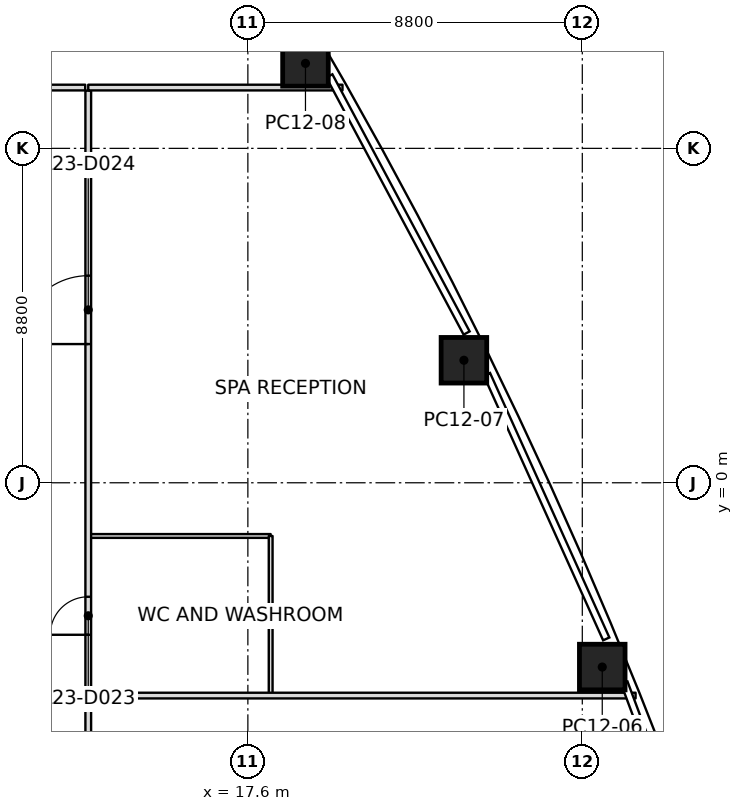
"""IFC4 building model, lengths in metres.
Left out: names, types, materials, properties, quantities, classifications, styles, units other than length and angle.
Written with IfcOpenShell. Run it as: python <this file> out.ifc"""

import sys

from ifc_helpers import new_model, si_unit, direction, frame, frame_2d, origin, origin_2d, place, context, subcontext, project, spatial, rectangle, extrude, clip, halfspace, element, fill, save


model = new_model("IFC4")
c1 = context("Model", 3, precision=1e-05, world=origin(), true_north=direction((0.0, 1.0)))
c2 = subcontext(c1, "Body", "Model", "MODEL_VIEW")
j1 = project(units=[si_unit("LENGTHUNIT", "METRE"), si_unit("PLANEANGLEUNIT", "RADIAN")], contexts=[c1])
p1 = place(None, origin())
s1 = spatial("IfcSite", under=j1, at=p1, CompositionType="ELEMENT")
p2 = place(p1, origin())
s2 = spatial("IfcBuilding", under=s1, at=p2, CompositionType="ELEMENT")
p3 = place(p2, frame((0.0, 0.0, 107.2)))
s3 = spatial("IfcBuildingStorey", under=s2, at=p3, CompositionType="ELEMENT", Elevation=107.2)
p4 = place(p3, frame((26.925, -4.849, 0.0), z_axis=(-0.01329019196, 0.007503985937, 0.999883523713), x_axis=(-0.380349266777, 0.924765125623, -0.011995736484)))
e1 = element("IfcColumn", 1, at=p4, inside=s3, PredefinedType="COLUMN", context=c2, shape_type="SweptSolid", body=[
    clip(clip(extrude(rectangle(XDim=1.2, YDim=1.2, at=origin_2d()), origin(), (0.0, 0.0, 1.0), 5.401), halfspace(frame((0.0, 0.0, 0.003)), True)), halfspace(frame((0.0, 0.0, 5.397)), False)),
])
p5 = place(p3, frame((23.285, 3.224, 0.0), z_axis=(-0.010488130075, 0.001582261003, 0.999943746207), x_axis=(-0.441147996554, 0.897413994602, -0.006047100909)))
e2 = element("IfcColumn", 2, at=p5, inside=s3, PredefinedType="COLUMN", context=c2, shape_type="SweptSolid", body=[
    clip(clip(extrude(rectangle(XDim=1.2, YDim=1.2, at=origin_2d()), origin(), (0.0, 0.0, 1.0), 5.4), halfspace(frame((0.0, 0.0, 0.002)), True)), halfspace(frame((0.0, 0.0, 5.397)), False)),
])
p6 = place(p3, frame((19.116, 11.036, 0.0), z_axis=(-0.007323758915, -0.004204380118, 0.999964342236), x_axis=(-0.499986590459, 0.866033145402, -2.0649448e-05)))
e3 = element("IfcColumn", 3, at=p6, inside=s3, PredefinedType="COLUMN", context=c2, shape_type="SweptSolid", body=[
    clip(clip(extrude(rectangle(XDim=1.2, YDim=1.2, at=origin_2d()), origin(), (0.0, 0.0, 1.0), 5.4), halfspace(frame((0.0, 0.0, 0.001)), True)), halfspace(frame((0.0, 0.0, 5.397)), False)),
])
p7 = place(p3, frame((27.802, -5.6, 0.0), z_axis=(0.0, 0.0, 1.0), x_axis=(-1.0, 0.0, 0.0)))
e4 = element("IfcWall", 4, at=p7, inside=s3, PredefinedType="PARTITIONING", context=c2, shape_type="SweptSolid", body=[
    extrude(rectangle(XDim=14.402, YDim=0.15, at=frame_2d((7.201, 0.0))), origin(), (0.0, 0.0, 1.0), 4.534),
])
p8 = place(p3, frame((13.4, 10.4, 0.0), z_axis=(0.0, 0.0, 1.0), x_axis=(1.0, 0.0, 0.0)))
e5 = element("IfcWall", 5, at=p8, inside=s3, PredefinedType="PARTITIONING", context=c2, shape_type="SweptSolid", body=[
    extrude(rectangle(XDim=6.69, YDim=0.15, at=frame_2d((3.345, 0.0))), origin(), (0.0, 0.0, 1.0), 4.534),
])
p9 = place(p3, frame((13.32, 10.4, 0.0), z_axis=(0.0, 0.0, 1.0), x_axis=(-1.0, 0.0, 0.0)))
e6 = element("IfcWall", 6, at=p9, inside=s3, PredefinedType="PARTITIONING", context=c2, shape_type="SweptSolid", body=[
    extrude(rectangle(XDim=26.64, YDim=0.15, at=frame_2d((13.32, 0.0))), origin(), (0.0, 0.0, 1.0), 4.397),
])
p10 = place(p9, frame((6.11, 0.0, 0.0)))
e7 = element("IfcOpeningElement", 7, at=p10, cuts=e6, PredefinedType="OPENING", context=c2, shape_type="SweptSolid", body=[
    extrude(rectangle(XDim=2.4, YDim=2.1, at=frame_2d((1.2, 1.05))), frame((0.0, 0.075, 0.0), z_axis=(0.0, -1.0, 0.0), x_axis=(1.0, 0.0, 0.0)), (0.0, 0.0, 1.0), 0.15),
])
p11 = place(p9, frame((16.32, 0.0, 0.0)))
e8 = element("IfcOpeningElement", 8, at=p11, cuts=e6, PredefinedType="OPENING", context=c2, shape_type="SweptSolid", body=[
    extrude(rectangle(XDim=1.0, YDim=2.1, at=frame_2d((0.5, 1.05))), frame((0.0, 0.075, 0.0), z_axis=(0.0, -1.0, 0.0), x_axis=(1.0, 0.0, 0.0)), (0.0, 0.0, 1.0), 0.15),
])
p12 = place(p9, frame((21.98, 0.0, 0.0)))
e9 = element("IfcOpeningElement", 9, at=p12, cuts=e6, PredefinedType="OPENING", context=c2, shape_type="SweptSolid", body=[
    extrude(rectangle(XDim=1.8, YDim=2.1, at=frame_2d((0.9, 1.05))), frame((0.0, 0.075, 0.0), z_axis=(0.0, -1.0, 0.0), x_axis=(1.0, 0.0, 0.0)), (0.0, 0.0, 1.0), 0.15),
])
p13 = place(p3, frame((13.4, -10.32, 0.0), z_axis=(0.0, 0.0, 1.0), x_axis=(0.0, 1.0, 0.0)))
e10 = element("IfcWall", 10, at=p13, inside=s3, PredefinedType="PARTITIONING", context=c2, shape_type="SweptSolid", body=[
    extrude(rectangle(XDim=20.64, YDim=0.15, at=frame_2d((10.32, 0.0))), origin(), (0.0, 0.0, 1.0), 4.397),
])
p14 = place(p13, frame((6.32, 0.0, 0.0)))
e11 = element("IfcOpeningElement", 11, at=p14, cuts=e10, PredefinedType="OPENING", context=c2, shape_type="SweptSolid", body=[
    extrude(rectangle(XDim=1.0, YDim=2.1, at=frame_2d((0.5, 1.05))), frame((0.0, 0.075, 0.0), z_axis=(0.0, -1.0, 0.0), x_axis=(1.0, 0.0, 0.0)), (0.0, 0.0, 1.0), 0.15),
])
p15 = place(p13, frame((13.97, 0.0, 0.0)))
e12 = element("IfcOpeningElement", 12, at=p15, cuts=e10, PredefinedType="OPENING", context=c2, shape_type="SweptSolid", body=[
    extrude(rectangle(XDim=1.8, YDim=2.1, at=frame_2d((0.9, 1.05))), frame((0.0, 0.075, 0.0), z_axis=(0.0, -1.0, 0.0), x_axis=(1.0, 0.0, 0.0)), (0.0, 0.0, 1.0), 0.15),
])
p16 = place(p13, frame((1.81, 0.0, 0.0)))
e13 = element("IfcOpeningElement", 13, at=p16, cuts=e10, PredefinedType="OPENING", context=c2, shape_type="SweptSolid", body=[
    extrude(rectangle(XDim=1.0, YDim=2.1, at=frame_2d((0.5, 1.05))), frame((0.0, 0.075, 0.0), z_axis=(0.0, -1.0, 0.0), x_axis=(1.0, 0.0, 0.0)), (0.0, 0.0, 1.0), 0.15),
])
p17 = place(p3, frame((13.43, -1.4, 0.0), z_axis=(0.0, 0.0, 1.0), x_axis=(1.0, 0.0, 0.0)))
e14 = element("IfcWall", 14, at=p17, inside=s3, PredefinedType="PARTITIONING", context=c2, shape_type="SweptSolid", body=[
    extrude(rectangle(XDim=4.77, YDim=0.1, at=frame_2d((2.385, 0.0))), origin(), (0.0, 0.0, 1.0), 4.75),
])
p18 = place(p3, frame((18.2, -1.4, 0.0), z_axis=(0.0, 0.0, 1.0), x_axis=(0.0, -1.0, 0.0)))
e15 = element("IfcWall", 15, at=p18, inside=s3, PredefinedType="PARTITIONING", context=c2, shape_type="SweptSolid", body=[
    extrude(rectangle(XDim=4.17, YDim=0.1, at=frame_2d((2.085, 0.0))), origin(), (0.0, 0.0, 1.0), 4.538),
])
p19 = place(p14, origin())
e16 = element("IfcDoor", 16, at=p19, inside=s3, OperationType="SINGLE_SWING_RIGHT", PredefinedType="DOOR", context=c2, shape_type="SweptSolid", body=[
    extrude(rectangle(XDim=1.0, YDim=2.1, at=frame_2d((0.5, 1.05))), frame((0.0, 0.025, 0.0), z_axis=(0.0, -1.0, 0.0), x_axis=(1.0, 0.0, 0.0)), (0.0, 0.0, 1.0), 0.05),
])
fill(e11, e16)
p20 = place(p15, origin())
e17 = element("IfcDoor", 17, at=p20, inside=s3, OperationType="DOUBLE_DOOR_SINGLE_SWING", PredefinedType="DOOR", context=c2, shape_type="SweptSolid", body=[
    extrude(rectangle(XDim=1.8, YDim=2.1, at=frame_2d((0.9, 1.05))), frame((0.0, 0.025, 0.0), z_axis=(0.0, -1.0, 0.0), x_axis=(1.0, 0.0, 0.0)), (0.0, 0.0, 1.0), 0.05),
])
fill(e12, e17)
save(model, sys.argv[1])
